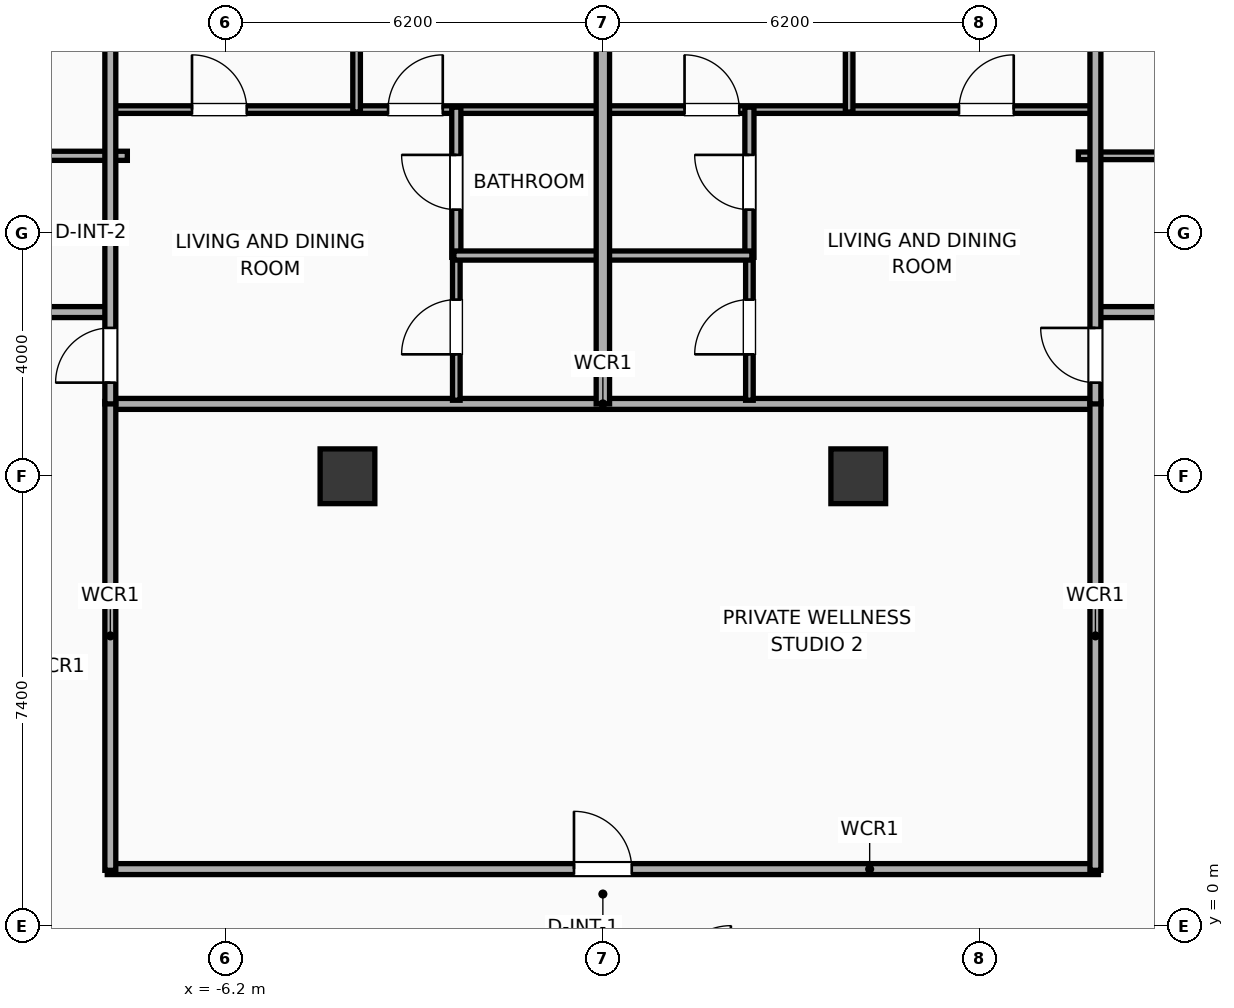
"""IFC4 building model, lengths in metres.
Left out: names, types, materials, properties, quantities, classifications, styles, units other than length and angle.
Written with IfcOpenShell. Run it as: python <this file> out.ifc"""

import sys

from ifc_helpers import new_model, si_unit, direction, frame, frame_2d, origin, origin_2d, place, context, subcontext, project, spatial, rectangle, extrude, element, fill, save


model = new_model("IFC4")
c1 = context("Model", 3, precision=1e-05, world=origin(), true_north=direction((0.0, 1.0)))
c2 = subcontext(c1, "Body", "Model", "MODEL_VIEW")
j1 = project(units=[si_unit("LENGTHUNIT", "METRE"), si_unit("PLANEANGLEUNIT", "RADIAN")], contexts=[c1])
p1 = place(None, origin())
s1 = spatial("IfcSite", under=j1, at=p1, CompositionType="ELEMENT")
p2 = place(p1, origin())
s2 = spatial("IfcBuilding", under=s1, at=p2, CompositionType="ELEMENT")
p3 = place(p2, frame((0.0, 0.0, 144.3)))
s3 = spatial("IfcBuildingStorey", under=s2, at=p3, CompositionType="ELEMENT", Elevation=144.3)
for number, where, z_axis, x_axis in (
    (1, (-4.2, 7.4, 0.0), (0.0, 0.0, 1.0), (1.0, 0.0, 0.0)),
    (2, (4.2, 7.4, 0.0), (0.0, 0.0, 1.0), (1.0, 0.0, 0.0)),
):
    element("IfcColumn", number, at=place(p3, frame(where, z_axis=z_axis, x_axis=x_axis)), inside=s3, PredefinedType="COLUMN", context=c2, shape_type="SweptSolid", body=[
        extrude(rectangle(XDim=0.9, YDim=0.9, at=origin_2d()), origin(), (0.0, 0.0, 1.0), 3.9),
    ])
p4 = place(p3, frame((-8.15, 8.59, 0.0), z_axis=(0.0, 0.0, 1.0), x_axis=(1.0, 0.0, 0.0)))
e3 = element("IfcWall", 3, at=p4, inside=s3, PredefinedType="PARTITIONING", context=c2, shape_type="SweptSolid", body=[
    extrude(rectangle(XDim=16.3, YDim=0.18, at=frame_2d((8.15, 0.0))), origin(), (0.0, 0.0, 1.0), 3.65),
])
p5 = place(p3, frame((-8.15, 0.94, 0.0), z_axis=(0.0, 0.0, 1.0), x_axis=(1.0, 0.0, 0.0)))
e4 = element("IfcWall", 4, at=p5, inside=s3, PredefinedType="PARTITIONING", context=c2, shape_type="SweptSolid", body=[
    extrude(rectangle(XDim=16.3, YDim=0.18, at=frame_2d((8.15, 0.0))), origin(), (0.0, 0.0, 1.0), 3.65),
])
p6 = place(p5, frame((7.675, 0.0, 0.0)))
e5 = element("IfcOpeningElement", 5, at=p6, cuts=e4, PredefinedType="OPENING", context=c2, shape_type="SweptSolid", body=[
    extrude(rectangle(XDim=0.95, YDim=2.05, at=frame_2d((0.475, 1.025))), frame((0.0, 0.1, 0.0), z_axis=(0.0, -1.0, 0.0), x_axis=(1.0, 0.0, 0.0)), (0.0, 0.0, 1.0), 0.2),
])
for number, where, z_axis, x_axis in (
    (6, (-8.1, 0.92, 0.0), (0.0, 0.0, 1.0), (0.0, 1.0, 0.0)),
    (7, (8.1, 0.92, 0.0), (0.0, 0.0, 1.0), (0.0, 1.0, 0.0)),
):
    element("IfcWall", number, at=place(p3, frame(where, z_axis=z_axis, x_axis=x_axis)), inside=s3, PredefinedType="PARTITIONING", context=c2, shape_type="SweptSolid", body=[
        extrude(rectangle(XDim=7.71, YDim=0.18, at=frame_2d((3.855, 0.0))), origin(), (0.0, 0.0, 1.0), 3.65),
    ])
p7 = place(p3, frame((-10.084, 12.67, 0.0), z_axis=(0.0, 0.0, 1.0), x_axis=(1.0, 0.0, 0.0)))
e8 = element("IfcWall", 8, at=p7, inside=s3, PredefinedType="PLUMBINGWALL", context=c2, shape_type="SweptSolid", body=[
    extrude(rectangle(XDim=2.264, YDim=0.15, at=frame_2d((1.132, 0.0))), origin(), (0.0, 0.0, 1.0), 3.65),
])
p8 = place(p3, frame((7.82, 12.67, 0.0), z_axis=(0.0, 0.0, 1.0), x_axis=(1.0, 0.0, 0.0)))
e9 = element("IfcWall", 9, at=p8, inside=s3, PredefinedType="PARTITIONING", context=c2, shape_type="SweptSolid", body=[
    extrude(rectangle(XDim=2.63, YDim=0.125, at=frame_2d((1.315, 0.0))), origin(), (0.0, 0.0, 1.0), 3.65),
])
p9 = place(p3, frame((-19.5, 10.1, 0.0), z_axis=(0.0, 0.0, 1.0), x_axis=(1.0, 0.0, 0.0)))
e10 = element("IfcWall", 10, at=p9, inside=s3, PredefinedType="PARTITIONING", context=c2, shape_type="SweptSolid", body=[
    extrude(rectangle(XDim=11.42, YDim=0.18, at=frame_2d((5.71, 0.0))), origin(), (0.0, 0.0, 1.0), 3.65),
])
p10 = place(p9, frame((3.464, 0.0, 0.0)))
e11 = element("IfcOpeningElement", 11, at=p10, cuts=e10, PredefinedType="OPENING", context=c2, shape_type="SweptSolid", body=[
    extrude(rectangle(XDim=1.15, YDim=2.05, at=frame_2d((0.575, 1.025))), frame((0.0, 0.1, 0.0), z_axis=(0.0, -1.0, 0.0), x_axis=(1.0, 0.0, 0.0)), (0.0, 0.0, 1.0), 0.2),
])
p11 = place(p9, frame((8.323, 0.0, 0.0)))
e12 = element("IfcOpeningElement", 12, at=p11, cuts=e10, PredefinedType="OPENING", context=c2, shape_type="SweptSolid", body=[
    extrude(rectangle(XDim=0.9, YDim=2.05, at=frame_2d((0.45, 1.025))), frame((0.0, 0.1, 0.0), z_axis=(0.0, -1.0, 0.0), x_axis=(1.0, 0.0, 0.0)), (0.0, 0.0, 1.0), 0.2),
])
p12 = place(p3, frame((8.08, 10.1, 0.0), z_axis=(0.0, 0.0, 1.0), x_axis=(1.0, 0.0, 0.0)))
e13 = element("IfcWall", 13, at=p12, inside=s3, PredefinedType="PARTITIONING", context=c2, shape_type="SweptSolid", body=[
    extrude(rectangle(XDim=11.42, YDim=0.18, at=frame_2d((5.71, 0.0))), origin(), (0.0, 0.0, 1.0), 3.65),
])
p13 = place(p12, frame((2.562, 0.0, 0.0)))
e14 = element("IfcOpeningElement", 14, at=p13, cuts=e13, PredefinedType="OPENING", context=c2, shape_type="SweptSolid", body=[
    extrude(rectangle(XDim=0.9, YDim=2.05, at=frame_2d((0.45, 1.025))), frame((0.0, 0.1, 0.0), z_axis=(0.0, -1.0, 0.0), x_axis=(1.0, 0.0, 0.0)), (0.0, 0.0, 1.0), 0.2),
])
p14 = place(p12, frame((6.853, 0.0, 0.0)))
e15 = element("IfcOpeningElement", 15, at=p14, cuts=e13, PredefinedType="OPENING", context=c2, shape_type="SweptSolid", body=[
    extrude(rectangle(XDim=1.15, YDim=2.05, at=frame_2d((0.575, 1.025))), frame((0.0, 0.1, 0.0), z_axis=(0.0, -1.0, 0.0), x_axis=(1.0, 0.0, 0.0)), (0.0, 0.0, 1.0), 0.2),
])
p15 = place(p3, frame((-8.08, 13.43, 0.0), z_axis=(0.0, 0.0, 1.0), x_axis=(1.0, 0.0, 0.0)))
e16 = element("IfcWall", 16, at=p15, inside=s3, PredefinedType="PARTITIONING", context=c2, shape_type="SweptSolid", body=[
    extrude(rectangle(XDim=8.06, YDim=0.125, at=frame_2d((4.03, 0.0))), origin(), (0.0, 0.0, 1.0), 3.65),
])
p16 = place(p15, frame((1.323, 0.0, 0.0)))
e17 = element("IfcOpeningElement", 17, at=p16, cuts=e16, PredefinedType="OPENING", context=c2, shape_type="SweptSolid", body=[
    extrude(rectangle(XDim=0.9, YDim=2.05, at=frame_2d((0.45, 1.025))), frame((0.0, 0.073, 0.0), z_axis=(0.0, -1.0, 0.0), x_axis=(1.0, 0.0, 0.0)), (0.0, 0.0, 1.0), 0.145),
])
p17 = place(p15, frame((4.547, 0.0, 0.0)))
e18 = element("IfcOpeningElement", 18, at=p17, cuts=e16, PredefinedType="OPENING", context=c2, shape_type="SweptSolid", body=[
    extrude(rectangle(XDim=0.9, YDim=2.05, at=frame_2d((0.45, 1.025))), frame((0.0, 0.073, 0.0), z_axis=(0.0, -1.0, 0.0), x_axis=(1.0, 0.0, 0.0)), (0.0, 0.0, 1.0), 0.145),
])
p18 = place(p3, frame((-2.41, 8.65, 0.0), z_axis=(0.0, 0.0, 1.0), x_axis=(0.0, 1.0, 0.0)))
e19 = element("IfcWall", 19, at=p18, inside=s3, PredefinedType="PARTITIONING", context=c2, shape_type="SweptSolid", body=[
    extrude(rectangle(XDim=2.41, YDim=0.125, at=frame_2d((1.205, 0.0))), origin(), (0.0, 0.0, 1.0), 2.54),
])
p19 = place(p18, frame((0.755, 0.0, 0.0)))
e20 = element("IfcOpeningElement", 20, at=p19, cuts=e19, PredefinedType="OPENING", context=c2, shape_type="SweptSolid", body=[
    extrude(rectangle(XDim=0.9, YDim=2.05, at=frame_2d((0.45, 1.025))), frame((0.0, 0.073, 0.0), z_axis=(0.0, -1.0, 0.0), x_axis=(1.0, 0.0, 0.0)), (0.0, 0.0, 1.0), 0.145),
])
p20 = place(p3, frame((-2.41, 11.0, 0.0), z_axis=(0.0, 0.0, 1.0), x_axis=(0.0, 1.0, 0.0)))
e21 = element("IfcWall", 21, at=p20, inside=s3, PredefinedType="PLUMBINGWALL", context=c2, shape_type="SweptSolid", body=[
    extrude(rectangle(XDim=2.47, YDim=0.15, at=frame_2d((1.235, 0.0))), origin(), (0.0, 0.0, 1.0), 2.54),
])
p21 = place(p20, frame((0.785, 0.0, 0.0)))
e22 = element("IfcOpeningElement", 22, at=p21, cuts=e21, PredefinedType="OPENING", context=c2, shape_type="SweptSolid", body=[
    extrude(rectangle(XDim=0.9, YDim=2.05, at=frame_2d((0.45, 1.025))), frame((0.0, 0.085, 0.0), z_axis=(0.0, -1.0, 0.0), x_axis=(1.0, 0.0, 0.0)), (0.0, 0.0, 1.0), 0.17),
])
p22 = place(p3, frame((-2.45, 11.03, 0.0), z_axis=(0.0, 0.0, 1.0), x_axis=(1.0, 0.0, 0.0)))
e23 = element("IfcWall", 23, at=p22, inside=s3, PredefinedType="PLUMBINGWALL", context=c2, shape_type="SweptSolid", body=[
    extrude(rectangle(XDim=2.43, YDim=0.15, at=frame_2d((1.215, 0.0))), origin(), (0.0, 0.0, 1.0), 3.65),
])
p23 = place(p3, frame((-4.05, 13.39, 0.0), z_axis=(0.0, 0.0, 1.0), x_axis=(0.0, 1.0, 0.0)))
e24 = element("IfcWall", 24, at=p23, inside=s3, PredefinedType="PARTITIONING", context=c2, shape_type="SweptSolid", body=[
    extrude(rectangle(XDim=6.262, YDim=0.125, at=frame_2d((3.131, 0.0))), origin(), (0.0, 0.0, 1.0), 3.65),
])
p24 = place(p3, frame((-8.1, 8.59, 0.0), z_axis=(0.0, 0.0, 1.0), x_axis=(0.0, 1.0, 0.0)))
e25 = element("IfcWall", 25, at=p24, inside=s3, PredefinedType="PARTITIONING", context=c2, shape_type="SweptSolid", body=[
    extrude(rectangle(XDim=10.636, YDim=0.18, at=frame_2d((5.318, 0.0))), origin(), (0.0, 0.0, 1.0), 3.65),
])
p25 = place(p24, frame((0.35, 0.0, 0.0)))
e26 = element("IfcOpeningElement", 26, at=p25, cuts=e25, PredefinedType="OPENING", context=c2, shape_type="SweptSolid", body=[
    extrude(rectangle(XDim=0.9, YDim=2.05, at=frame_2d((0.45, 1.025))), frame((0.0, 0.1, 0.0), z_axis=(0.0, -1.0, 0.0), x_axis=(1.0, 0.0, 0.0)), (0.0, 0.0, 1.0), 0.2),
])
p26 = place(p3, frame((0.02, 13.43, 0.0), z_axis=(0.0, 0.0, 1.0), x_axis=(1.0, 0.0, 0.0)))
e27 = element("IfcWall", 27, at=p26, inside=s3, PredefinedType="PARTITIONING", context=c2, shape_type="SweptSolid", body=[
    extrude(rectangle(XDim=8.06, YDim=0.125, at=frame_2d((4.03, 0.0))), origin(), (0.0, 0.0, 1.0), 3.65),
])
p27 = place(p26, frame((1.323, 0.0, 0.0)))
e28 = element("IfcOpeningElement", 28, at=p27, cuts=e27, PredefinedType="OPENING", context=c2, shape_type="SweptSolid", body=[
    extrude(rectangle(XDim=0.9, YDim=2.05, at=frame_2d((0.45, 1.025))), frame((0.0, 0.073, 0.0), z_axis=(0.0, -1.0, 0.0), x_axis=(1.0, 0.0, 0.0)), (0.0, 0.0, 1.0), 0.145),
])
p28 = place(p26, frame((5.837, 0.0, 0.0)))
e29 = element("IfcOpeningElement", 29, at=p28, cuts=e27, PredefinedType="OPENING", context=c2, shape_type="SweptSolid", body=[
    extrude(rectangle(XDim=0.9, YDim=2.05, at=frame_2d((0.45, 1.025))), frame((0.0, 0.073, 0.0), z_axis=(0.0, -1.0, 0.0), x_axis=(1.0, 0.0, 0.0)), (0.0, 0.0, 1.0), 0.145),
])
p29 = place(p3, frame((2.41, 8.65, 0.0), z_axis=(0.0, 0.0, 1.0), x_axis=(0.0, 1.0, 0.0)))
e30 = element("IfcWall", 30, at=p29, inside=s3, PredefinedType="PARTITIONING", context=c2, shape_type="SweptSolid", body=[
    extrude(rectangle(XDim=2.41, YDim=0.125, at=frame_2d((1.205, 0.0))), origin(), (0.0, 0.0, 1.0), 3.65),
])
p30 = place(p29, frame((0.755, 0.0, 0.0)))
e31 = element("IfcOpeningElement", 31, at=p30, cuts=e30, PredefinedType="OPENING", context=c2, shape_type="SweptSolid", body=[
    extrude(rectangle(XDim=0.9, YDim=2.05, at=frame_2d((0.45, 1.025))), frame((0.0, 0.073, 0.0), z_axis=(0.0, -1.0, 0.0), x_axis=(1.0, 0.0, 0.0)), (0.0, 0.0, 1.0), 0.145),
])
p31 = place(p3, frame((2.41, 11.0, 0.0), z_axis=(0.0, 0.0, 1.0), x_axis=(0.0, 1.0, 0.0)))
e32 = element("IfcWall", 32, at=p31, inside=s3, PredefinedType="PLUMBINGWALL", context=c2, shape_type="SweptSolid", body=[
    extrude(rectangle(XDim=2.47, YDim=0.15, at=frame_2d((1.235, 0.0))), origin(), (0.0, 0.0, 1.0), 3.65),
])
p32 = place(p31, frame((0.785, 0.0, 0.0)))
e33 = element("IfcOpeningElement", 33, at=p32, cuts=e32, PredefinedType="OPENING", context=c2, shape_type="SweptSolid", body=[
    extrude(rectangle(XDim=0.9, YDim=2.05, at=frame_2d((0.45, 1.025))), frame((0.0, 0.085, 0.0), z_axis=(0.0, -1.0, 0.0), x_axis=(1.0, 0.0, 0.0)), (0.0, 0.0, 1.0), 0.17),
])
p33 = place(p3, frame((0.02, 11.03, 0.0), z_axis=(0.0, 0.0, 1.0), x_axis=(1.0, 0.0, 0.0)))
e34 = element("IfcWall", 34, at=p33, inside=s3, PredefinedType="PLUMBINGWALL", context=c2, shape_type="SweptSolid", body=[
    extrude(rectangle(XDim=2.43, YDim=0.15, at=frame_2d((1.215, 0.0))), origin(), (0.0, 0.0, 1.0), 3.65),
])
p34 = place(p3, frame((4.05, 13.39, 0.0), z_axis=(0.0, 0.0, 1.0), x_axis=(0.0, 1.0, 0.0)))
e35 = element("IfcWall", 35, at=p34, inside=s3, PredefinedType="PARTITIONING", context=c2, shape_type="SweptSolid", body=[
    extrude(rectangle(XDim=7.114, YDim=0.125, at=frame_2d((3.557, 0.0))), origin(), (0.0, 0.0, 1.0), 3.65),
])
p35 = place(p3, frame((8.1, 8.59, 0.0), z_axis=(0.0, 0.0, 1.0), x_axis=(0.0, 1.0, 0.0)))
e36 = element("IfcWall", 36, at=p35, inside=s3, PredefinedType="PARTITIONING", context=c2, shape_type="SweptSolid", body=[
    extrude(rectangle(XDim=12.339, YDim=0.18, at=frame_2d((6.169, 0.0))), origin(), (0.0, 0.0, 1.0), 3.65),
])
p36 = place(p35, frame((0.35, 0.0, 0.0)))
e37 = element("IfcOpeningElement", 37, at=p36, cuts=e36, PredefinedType="OPENING", context=c2, shape_type="SweptSolid", body=[
    extrude(rectangle(XDim=0.9, YDim=2.05, at=frame_2d((0.45, 1.025))), frame((0.0, 0.1, 0.0), z_axis=(0.0, -1.0, 0.0), x_axis=(1.0, 0.0, 0.0)), (0.0, 0.0, 1.0), 0.2),
])
p37 = place(p3, frame((0.0, 8.59, 0.0), z_axis=(0.0, 0.0, 1.0), x_axis=(0.0, 1.0, 0.0)))
e38 = element("IfcWall", 38, at=p37, inside=s3, PredefinedType="PARTITIONING", context=c2, shape_type="SweptSolid", body=[
    extrude(rectangle(XDim=11.488, YDim=0.22, at=frame_2d((5.744, 0.0))), origin(), (0.0, 0.0, 1.0), 2.54),
])
p38 = place(p6, origin())
e39 = element("IfcDoor", 39, at=p38, inside=s3, OperationType="SINGLE_SWING_LEFT", PredefinedType="DOOR", context=c2, shape_type="SweptSolid", body=[
    extrude(rectangle(XDim=0.95, YDim=2.05, at=frame_2d((0.475, 1.025))), frame((0.0, 0.025, 0.0), z_axis=(0.0, -1.0, 0.0), x_axis=(1.0, 0.0, 0.0)), (0.0, 0.0, 1.0), 0.05),
])
fill(e5, e39)
p39 = place(p16, origin())
e40 = element("IfcDoor", 40, at=p39, inside=s3, OperationType="SINGLE_SWING_LEFT", PredefinedType="DOOR", context=c2, shape_type="SweptSolid", body=[
    extrude(rectangle(XDim=0.9, YDim=2.05, at=frame_2d((0.45, 1.025))), frame((0.0, 0.025, 0.0), z_axis=(0.0, -1.0, 0.0), x_axis=(1.0, 0.0, 0.0)), (0.0, 0.0, 1.0), 0.05),
])
fill(e17, e40)
p40 = place(p17, origin())
e41 = element("IfcDoor", 41, at=p40, inside=s3, OperationType="SINGLE_SWING_RIGHT", PredefinedType="DOOR", context=c2, shape_type="SweptSolid", body=[
    extrude(rectangle(XDim=0.9, YDim=2.05, at=frame_2d((0.45, 1.025))), frame((0.0, 0.025, 0.0), z_axis=(0.0, -1.0, 0.0), x_axis=(1.0, 0.0, 0.0)), (0.0, 0.0, 1.0), 0.05),
])
fill(e18, e41)
p41 = place(p19, origin())
e42 = element("IfcDoor", 42, at=p41, inside=s3, OperationType="SINGLE_SWING_LEFT", PredefinedType="DOOR", context=c2, shape_type="SweptSolid", body=[
    extrude(rectangle(XDim=0.9, YDim=2.05, at=frame_2d((0.45, 1.025))), frame((0.0, 0.025, 0.0), z_axis=(0.0, -1.0, 0.0), x_axis=(1.0, 0.0, 0.0)), (0.0, 0.0, 1.0), 0.05),
])
fill(e20, e42)
p42 = place(p21, origin())
e43 = element("IfcDoor", 43, at=p42, inside=s3, OperationType="SINGLE_SWING_RIGHT", PredefinedType="DOOR", context=c2, shape_type="SweptSolid", body=[
    extrude(rectangle(XDim=0.9, YDim=2.05, at=frame_2d((0.45, 1.025))), frame((0.0, 0.025, 0.0), z_axis=(0.0, -1.0, 0.0), x_axis=(1.0, 0.0, 0.0)), (0.0, 0.0, 1.0), 0.05),
])
fill(e22, e43)
p43 = place(p25, origin())
e44 = element("IfcDoor", 44, at=p43, inside=s3, OperationType="SINGLE_SWING_LEFT", PredefinedType="DOOR", context=c2, shape_type="SweptSolid", body=[
    extrude(rectangle(XDim=0.9, YDim=2.05, at=frame_2d((0.45, 1.025))), frame((0.0, 0.025, 0.0), z_axis=(0.0, -1.0, 0.0), x_axis=(1.0, 0.0, 0.0)), (0.0, 0.0, 1.0), 0.05),
])
fill(e26, e44)
p44 = place(p27, origin())
e45 = element("IfcDoor", 45, at=p44, inside=s3, OperationType="SINGLE_SWING_LEFT", PredefinedType="DOOR", context=c2, shape_type="SweptSolid", body=[
    extrude(rectangle(XDim=0.9, YDim=2.05, at=frame_2d((0.45, 1.025))), frame((0.0, 0.025, 0.0), z_axis=(0.0, -1.0, 0.0), x_axis=(1.0, 0.0, 0.0)), (0.0, 0.0, 1.0), 0.05),
])
fill(e28, e45)
p45 = place(p28, origin())
e46 = element("IfcDoor", 46, at=p45, inside=s3, OperationType="SINGLE_SWING_RIGHT", PredefinedType="DOOR", context=c2, shape_type="SweptSolid", body=[
    extrude(rectangle(XDim=0.9, YDim=2.05, at=frame_2d((0.45, 1.025))), frame((0.0, 0.025, 0.0), z_axis=(0.0, -1.0, 0.0), x_axis=(1.0, 0.0, 0.0)), (0.0, 0.0, 1.0), 0.05),
])
fill(e29, e46)
p46 = place(p30, origin())
e47 = element("IfcDoor", 47, at=p46, inside=s3, OperationType="SINGLE_SWING_LEFT", PredefinedType="DOOR", context=c2, shape_type="SweptSolid", body=[
    extrude(rectangle(XDim=0.9, YDim=2.05, at=frame_2d((0.45, 1.025))), frame((0.0, 0.025, 0.0), z_axis=(0.0, -1.0, 0.0), x_axis=(1.0, 0.0, 0.0)), (0.0, 0.0, 1.0), 0.05),
])
fill(e31, e47)
p47 = place(p32, origin())
e48 = element("IfcDoor", 48, at=p47, inside=s3, OperationType="SINGLE_SWING_RIGHT", PredefinedType="DOOR", context=c2, shape_type="SweptSolid", body=[
    extrude(rectangle(XDim=0.9, YDim=2.05, at=frame_2d((0.45, 1.025))), frame((0.0, 0.025, 0.0), z_axis=(0.0, -1.0, 0.0), x_axis=(1.0, 0.0, 0.0)), (0.0, 0.0, 1.0), 0.05),
])
fill(e33, e48)
p48 = place(p36, origin())
e49 = element("IfcDoor", 49, at=p48, inside=s3, OperationType="SINGLE_SWING_RIGHT", PredefinedType="DOOR", context=c2, shape_type="SweptSolid", body=[
    extrude(rectangle(XDim=0.9, YDim=2.05, at=frame_2d((0.45, 1.025))), frame((0.0, 0.025, 0.0), z_axis=(0.0, -1.0, 0.0), x_axis=(1.0, 0.0, 0.0)), (0.0, 0.0, 1.0), 0.05),
])
fill(e37, e49)
save(model, sys.argv[1])
